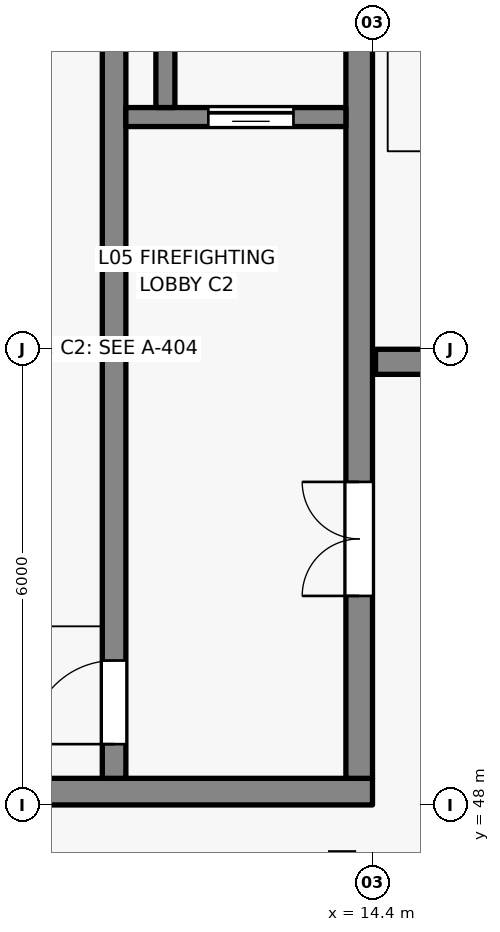
"""IFC4 building model, lengths in metres.
Left out: names, types, materials, properties, quantities, classifications, styles, units other than length and angle.
Written with IfcOpenShell. Run it as: python <this file> out.ifc"""

import sys

from ifc_helpers import new_model, si_unit, direction, frame, frame_2d, origin, place, context, subcontext, project, spatial, rectangle, extrude, element, fill, save


model = new_model("IFC4")
c1 = context("Model", 3, precision=1e-05, world=origin(), true_north=direction((0.0, 1.0)))
c2 = subcontext(c1, "Body", "Model", "MODEL_VIEW")
j1 = project(units=[si_unit("LENGTHUNIT", "METRE"), si_unit("PLANEANGLEUNIT", "RADIAN")], contexts=[c1])
p1 = place(None, origin())
s1 = spatial("IfcSite", under=j1, at=p1, CompositionType="ELEMENT")
p2 = place(p1, origin())
s2 = spatial("IfcBuilding", under=s1, at=p2, CompositionType="ELEMENT")
p3 = place(p2, frame((0.0, 0.0, 18.75)))
s3 = spatial("IfcBuildingStorey", under=s2, at=p3, CompositionType="ELEMENT", Elevation=18.75)
p4 = place(p3, frame((7.2, 48.175, 0.0), z_axis=(0.0, 0.0, 1.0), x_axis=(1.0, 0.0, 0.0)))
e1 = element("IfcWall", 1, at=p4, inside=s3, PredefinedType="SHEAR", context=c2, shape_type="SweptSolid", body=[
    extrude(rectangle(XDim=7.2, YDim=0.35, at=frame_2d((3.6, 0.0))), origin(), (0.0, 0.0, 1.0), 3.71),
])
p5 = place(p3, frame((14.225, 48.35, 0.0), z_axis=(0.0, 0.0, 1.0), x_axis=(0.0, 1.0, 0.0)))
e2 = element("IfcWall", 2, at=p5, inside=s3, PredefinedType="SHEAR", context=c2, shape_type="SweptSolid", body=[
    extrude(rectangle(XDim=11.3, YDim=0.35, at=frame_2d((5.65, 0.0))), origin(), (0.0, 0.0, 1.0), 3.71),
])
p6 = place(p5, frame((2.4, 0.0, 0.0)))
e3 = element("IfcOpeningElement", 3, at=p6, cuts=e2, PredefinedType="OPENING", context=c2, shape_type="SweptSolid", body=[
    extrude(rectangle(XDim=1.5, YDim=2.15, at=frame_2d((0.75, 1.075))), frame((0.0, 0.185, 0.0), z_axis=(0.0, -1.0, 0.0), x_axis=(1.0, 0.0, 0.0)), (0.0, 0.0, 1.0), 0.37),
])
p7 = place(p3, frame((11.0, 48.35, 0.0), z_axis=(0.0, 0.0, 1.0), x_axis=(0.0, 1.0, 0.0)))
e4 = element("IfcWall", 4, at=p7, inside=s3, PredefinedType="SHEAR", context=c2, shape_type="SweptSolid", body=[
    extrude(rectangle(XDim=11.3, YDim=0.31, at=frame_2d((5.65, 0.0))), origin(), (0.0, 0.0, 1.0), 3.71),
])
p8 = place(p7, frame((0.45, 0.0, 0.0)))
e5 = element("IfcOpeningElement", 5, at=p8, cuts=e4, PredefinedType="OPENING", context=c2, shape_type="SweptSolid", body=[
    extrude(rectangle(XDim=1.1, YDim=2.15, at=frame_2d((0.55, 1.075))), frame((0.0, 0.165, 0.0), z_axis=(0.0, -1.0, 0.0), x_axis=(1.0, 0.0, 0.0)), (0.0, 0.0, 1.0), 0.33),
])
p9 = place(p3, frame((21.6, 53.83, 0.0), z_axis=(0.0, 0.0, 1.0), x_axis=(-1.0, 0.0, 0.0)))
e6 = element("IfcWall", 6, at=p9, inside=s3, PredefinedType="SOLIDWALL", context=c2, shape_type="SweptSolid", body=[
    extrude(rectangle(XDim=7.16, YDim=0.33, at=frame_2d((3.58, 0.0))), origin(), (0.0, 0.0, 1.0), 3.505),
])
p10 = place(p9, frame((1.608, 0.0, 0.0)))
e7 = element("IfcOpeningElement", 7, at=p10, cuts=e6, PredefinedType="OPENING", context=c2, shape_type="SweptSolid", body=[
    extrude(rectangle(XDim=1.08, YDim=2.2, at=frame_2d((0.54, 1.1))), frame((0.0, 0.175, 0.0), z_axis=(0.0, -1.0, 0.0), x_axis=(1.0, 0.0, 0.0)), (0.0, 0.0, 1.0), 0.35),
])
p11 = place(p3, frame((11.155, 57.05, 0.0), z_axis=(0.0, 0.0, 1.0), x_axis=(1.0, 0.0, 0.0)))
e8 = element("IfcWall", 8, at=p11, inside=s3, PredefinedType="SHEAR", context=c2, shape_type="SweptSolid", body=[
    extrude(rectangle(XDim=2.895, YDim=0.25, at=frame_2d((1.448, 0.0))), origin(), (0.0, 0.0, 1.0), 3.71),
])
p12 = place(p11, frame((1.085, 0.0, 0.0)))
e9 = element("IfcOpeningElement", 9, at=p12, cuts=e8, PredefinedType="OPENING", context=c2, shape_type="SweptSolid", body=[
    extrude(rectangle(XDim=1.12, YDim=2.15, at=frame_2d((0.56, 1.075))), frame((0.0, 0.135, 0.0), z_axis=(0.0, -1.0, 0.0), x_axis=(1.0, 0.0, 0.0)), (0.0, 0.0, 1.0), 0.27),
])
p13 = place(p3, frame((11.675, 57.175, 0.0), z_axis=(0.0, 0.0, 1.0), x_axis=(0.0, 1.0, 0.0)))
e10 = element("IfcWall", 10, at=p13, inside=s3, PredefinedType="SHEAR", context=c2, shape_type="SweptSolid", body=[
    extrude(rectangle(XDim=2.475, YDim=0.25, at=frame_2d((1.237, 0.0))), origin(), (0.0, 0.0, 1.0), 3.71),
])
p14 = place(p12, origin())
e11 = element("IfcDoor", 11, at=p14, inside=s3, OperationType="SLIDING_TO_LEFT", PredefinedType="DOOR", context=c2, shape_type="SweptSolid", body=[
    extrude(rectangle(XDim=1.12, YDim=2.15, at=frame_2d((0.56, 1.075))), frame((0.0, 0.025, 0.0), z_axis=(0.0, -1.0, 0.0), x_axis=(1.0, 0.0, 0.0)), (0.0, 0.0, 1.0), 0.05),
])
fill(e9, e11)
p15 = place(p6, origin())
e12 = element("IfcDoor", 12, at=p15, inside=s3, OperationType="DOUBLE_DOOR_SINGLE_SWING", PredefinedType="DOOR", context=c2, shape_type="SweptSolid", body=[
    extrude(rectangle(XDim=1.5, YDim=2.15, at=frame_2d((0.75, 1.075))), frame((0.0, 0.025, 0.0), z_axis=(0.0, -1.0, 0.0), x_axis=(1.0, 0.0, 0.0)), (0.0, 0.0, 1.0), 0.05),
])
fill(e3, e12)
p16 = place(p8, origin())
e13 = element("IfcDoor", 13, at=p16, inside=s3, OperationType="SINGLE_SWING_LEFT", PredefinedType="DOOR", context=c2, shape_type="SweptSolid", body=[
    extrude(rectangle(XDim=1.1, YDim=2.15, at=frame_2d((0.55, 1.075))), frame((0.0, 0.025, 0.0), z_axis=(0.0, -1.0, 0.0), x_axis=(1.0, 0.0, 0.0)), (0.0, 0.0, 1.0), 0.05),
])
fill(e5, e13)
save(model, sys.argv[1])
